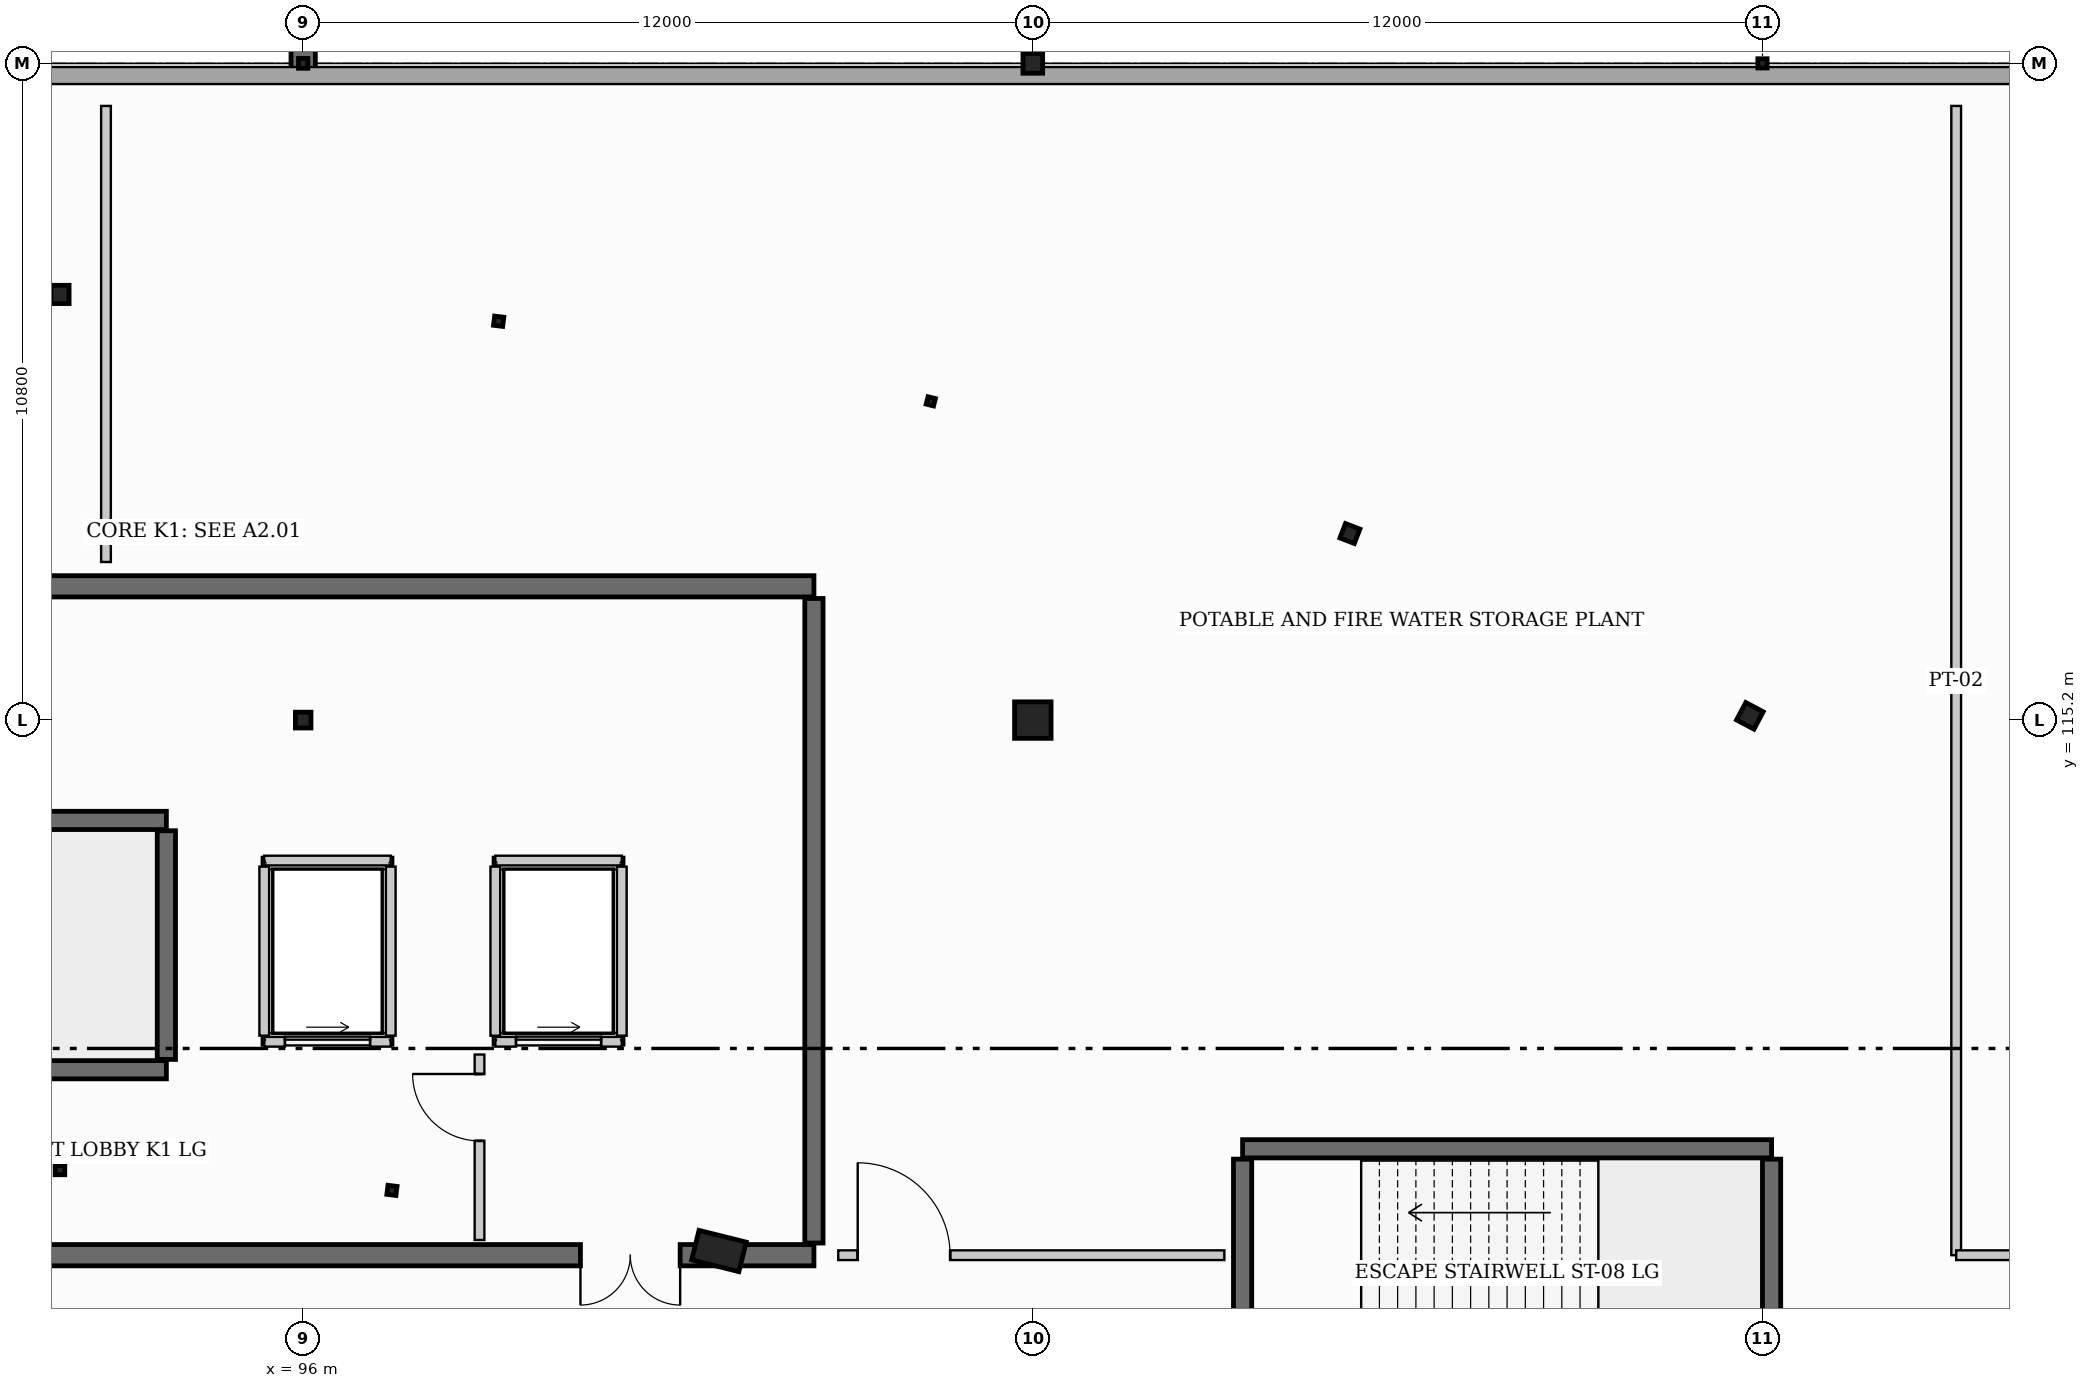
"""IFC4 building model, lengths in metres.
Left out: names, types, materials, properties, quantities, classifications, styles, units other than length and angle.
Written with IfcOpenShell. Run it as: python <this file> out.ifc"""

import sys

from ifc_helpers import new_model, si_unit, direction, frame, frame_2d, origin, origin_2d, place, context, subcontext, project, spatial, rectangle, hollow_rectangle, hollow_circle, i_section, extrude, element, fill, save


model = new_model("IFC4")
c1 = context("Model", 3, precision=1e-05, world=origin(), true_north=direction((0.0, 1.0)))
c2 = subcontext(c1, "Body", "Model", "MODEL_VIEW")
j1 = project(units=[si_unit("LENGTHUNIT", "METRE"), si_unit("PLANEANGLEUNIT", "RADIAN")], contexts=[c1])
p1 = place(None, origin())
s1 = spatial("IfcSite", under=j1, at=p1, CompositionType="ELEMENT")
p2 = place(p1, origin())
s2 = spatial("IfcBuilding", under=s1, at=p2, CompositionType="ELEMENT")
p3 = place(p2, frame((0.0, 0.0, -4.8)))
s3 = spatial("IfcBuildingStorey", under=s2, at=p3, CompositionType="ELEMENT", Elevation=-4.8)
p4 = place(p3, frame((96.0, 125.8, 0.0), z_axis=(0.0, 0.0, 1.0), x_axis=(0.0, 1.0, 0.0)))
e1 = element("IfcWall", 1, at=p4, inside=s3, PredefinedType="USERDEFINED", context=c2, shape_type="SweptSolid", body=[
    extrude(rectangle(XDim=5.2, YDim=0.4, at=frame_2d((2.6, 0.0))), origin(), (0.0, 0.0, 1.0), 4.8),
])
p5 = place(p3, frame((96.0, 115.2, 0.0), z_axis=(0.0, 0.0, 1.0), x_axis=(1.0, 0.0, 0.0)))
e2 = element("IfcColumn", 2, at=p5, inside=s3, PredefinedType="COLUMN", context=c2, shape_type="SweptSolid", body=[
    extrude(i_section(OverallWidth=0.256, OverallDepth=0.26, WebThickness=0.01, FlangeThickness=0.017, at=origin_2d()), origin(), (0.0, 0.0, 1.0), 4.8),
])
p6 = place(p3, frame((96.0, 126.0, 0.0), z_axis=(0.0, 0.0, 1.0), x_axis=(1.0, 0.0, 0.0)))
e3 = element("IfcColumn", 3, at=p6, inside=s3, PredefinedType="COLUMN", context=c2, shape_type="SweptSolid", body=[
    extrude(i_section(OverallWidth=0.154, OverallDepth=0.162, WebThickness=0.008, FlangeThickness=0.011, at=origin_2d()), origin(), (0.0, 0.0, 1.0), 4.8),
])
p7 = place(p3, frame((108.0, 115.2, 0.0), z_axis=(0.0, 0.0, 1.0), x_axis=(0.0, 1.0, 0.0)))
e4 = element("IfcColumn", 4, at=p7, inside=s3, PredefinedType="COLUMN", context=c2, shape_type="SweptSolid", body=[
    extrude(rectangle(XDim=0.6, YDim=0.6, at=origin_2d()), origin(), (0.0, 0.0, 1.0), 4.8),
])
p8 = place(p3, frame((108.0, 126.0, 0.0), z_axis=(0.0, 0.0, 1.0), x_axis=(0.0, 1.0, 0.0)))
e5 = element("IfcColumn", 5, at=p8, inside=s3, PredefinedType="COLUMN", context=c2, shape_type="SweptSolid", body=[
    extrude(hollow_circle(Radius=0.162, WallThickness=0.013, at=origin_2d()), origin(), (0.0, 0.0, 1.0), 4.8),
])
p9 = place(p3, frame((120.0, 126.0, 0.0), z_axis=(0.0, 0.0, 1.0), x_axis=(1.0, 0.0, 0.0)))
e6 = element("IfcColumn", 6, at=p9, inside=s3, PredefinedType="COLUMN", context=c2, shape_type="SweptSolid", body=[
    extrude(i_section(OverallWidth=0.152, OverallDepth=0.152, WebThickness=0.006, FlangeThickness=0.007, at=origin_2d()), origin(), (0.0, 0.0, 1.0), 4.8),
])
p10 = place(p3, frame((92.0, 122.2, 0.0), z_axis=(0.0, 0.0, 1.0), x_axis=(0.0, 1.0, 0.0)))
e7 = element("IfcColumn", 7, at=p10, inside=s3, PredefinedType="COLUMN", context=c2, shape_type="SweptSolid", body=[
    extrude(hollow_rectangle(XDim=0.3, YDim=0.3, WallThickness=0.012, at=origin_2d()), origin(), (0.0, 0.0, 1.0), 4.8),
])
p11 = place(p3, frame((92.0, 107.8, 0.0), z_axis=(0.0, 0.0, 1.0), x_axis=(0.0, 1.0, 0.0)))
e8 = element("IfcColumn", 8, at=p11, inside=s3, PredefinedType="COLUMN", context=c2, shape_type="SweptSolid", body=[
    extrude(i_section(OverallWidth=0.153, OverallDepth=0.158, WebThickness=0.007, FlangeThickness=0.01, at=origin_2d()), origin(), (0.0, 0.0, 1.0), 4.8),
])
p12 = place(p3, frame((99.215, 121.759, 0.0), z_axis=(0.0, 0.0, 1.0), x_axis=(0.121869343405, 0.992546151641, 0.0)))
e9 = element("IfcColumn", 9, at=p12, inside=s3, PredefinedType="COLUMN", context=c2, shape_type="SweptSolid", body=[
    extrude(i_section(OverallWidth=0.152, OverallDepth=0.152, WebThickness=0.006, FlangeThickness=0.007, at=origin_2d()), origin(), (0.0, 0.0, 1.0), 4.8),
])
p13 = place(p3, frame((97.46, 107.466, 0.0), z_axis=(0.0, 0.0, 1.0), x_axis=(0.121869343405, 0.992546151641, 0.0)))
e10 = element("IfcColumn", 10, at=p13, inside=s3, PredefinedType="COLUMN", context=c2, shape_type="SweptSolid", body=[
    extrude(hollow_rectangle(XDim=0.15, YDim=0.15, WallThickness=0.008, at=origin_2d()), origin(), (0.0, 0.0, 1.0), 4.8),
])
p14 = place(p3, frame((106.322, 120.442, 0.0), z_axis=(0.0, 0.0, 1.0), x_axis=(0.2419218956, 0.970295726276, 0.0)))
e11 = element("IfcColumn", 11, at=p14, inside=s3, PredefinedType="COLUMN", context=c2, shape_type="SweptSolid", body=[
    extrude(hollow_rectangle(XDim=0.125, YDim=0.125, WallThickness=0.006, at=origin_2d()), origin(), (0.0, 0.0, 1.0), 4.8),
])
p15 = place(p3, frame((102.838, 106.469, 0.0), z_axis=(0.0, 0.0, 1.0), x_axis=(0.2419218956, 0.970295726276, 0.0)))
e12 = element("IfcColumn", 12, at=p15, inside=s3, PredefinedType="PILASTER", context=c2, shape_type="SweptSolid", body=[
    extrude(rectangle(XDim=0.5, YDim=0.8, at=origin_2d()), origin(), (0.0, 0.0, 1.0), 4.8),
])
p16 = place(p3, frame((113.215, 118.268, 0.0), z_axis=(0.0, 0.0, 1.0), x_axis=(0.358367949545, 0.933580426497, 0.0)))
e13 = element("IfcColumn", 13, at=p16, inside=s3, PredefinedType="COLUMN", context=c2, shape_type="SweptSolid", body=[
    extrude(i_section(OverallWidth=0.254, OverallDepth=0.254, WebThickness=0.009, FlangeThickness=0.014, at=origin_2d()), origin(), (0.0, 0.0, 1.0), 4.8),
])
p17 = place(p3, frame((119.793, 115.27, 0.0), z_axis=(0.0, 0.0, 1.0), x_axis=(0.469471562786, 0.882947592859, 0.0)))
e14 = element("IfcColumn", 14, at=p17, inside=s3, PredefinedType="COLUMN", context=c2, shape_type="SweptSolid", body=[
    extrude(hollow_circle(Radius=0.162, WallThickness=0.013, at=origin_2d()), origin(), (0.0, 0.0, 1.0), 4.8),
])
p18 = place(p3, frame((84.0, 117.4, 0.0), z_axis=(0.0, 0.0, 1.0), x_axis=(1.0, 0.0, 0.0)))
e15 = element("IfcWall", 15, at=p18, inside=s3, PredefinedType="SHEAR", context=c2, shape_type="SweptSolid", body=[
    extrude(rectangle(XDim=20.4, YDim=0.35, at=frame_2d((10.2, 0.0))), origin(), (0.0, 0.0, 1.0), 4.8),
])
p19 = place(p3, frame((104.4, 106.4, 0.0), z_axis=(0.0, 0.0, 1.0), x_axis=(-1.0, 0.0, 0.0)))
e16 = element("IfcWall", 16, at=p19, inside=s3, PredefinedType="SHEAR", context=c2, shape_type="SweptSolid", body=[
    extrude(rectangle(XDim=20.4, YDim=0.35, at=frame_2d((10.2, 0.0))), origin(), (0.0, 0.0, 1.0), 4.8),
])
p20 = place(p19, frame((2.2, 0.0, 0.0)))
e17 = element("IfcOpeningElement", 17, at=p20, cuts=e16, PredefinedType="OPENING", context=c2, shape_type="SweptSolid", body=[
    extrude(rectangle(XDim=1.64, YDim=2.2, at=frame_2d((0.82, 1.1))), frame((0.0, 0.185, 0.0), z_axis=(0.0, -1.0, 0.0), x_axis=(1.0, 0.0, 0.0)), (0.0, 0.0, 1.0), 0.37),
])
p21 = place(p19, frame((13.0, 0.0, 0.0)))
e18 = element("IfcOpeningElement", 18, at=p21, cuts=e16, PredefinedType="OPENING", context=c2, shape_type="SweptSolid", body=[
    extrude(rectangle(XDim=1.52, YDim=2.16, at=frame_2d((0.76, 1.08))), frame((0.0, 0.185, 0.0), z_axis=(0.0, -1.0, 0.0), x_axis=(1.0, 0.0, 0.0)), (0.0, 0.0, 1.0), 0.37),
])
p22 = place(p3, frame((104.4, 117.2, 0.0), z_axis=(0.0, 0.0, 1.0), x_axis=(0.0, -1.0, 0.0)))
e19 = element("IfcWall", 19, at=p22, inside=s3, PredefinedType="SHEAR", context=c2, shape_type="SweptSolid", body=[
    extrude(rectangle(XDim=10.6, YDim=0.3, at=frame_2d((5.3, 0.0))), origin(), (0.0, 0.0, 1.0), 4.8),
])
p23 = place(p3, frame((85.05, 109.45, 0.0), z_axis=(0.0, 0.0, 1.0), x_axis=(1.0, 0.0, 0.0)))
e20 = element("IfcWall", 20, at=p23, inside=s3, PredefinedType="SHEAR", context=c2, shape_type="SweptSolid", body=[
    extrude(rectangle(XDim=8.7, YDim=0.3, at=frame_2d((4.35, 0.0))), origin(), (0.0, 0.0, 1.0), 4.8),
])
p24 = place(p23, frame((0.35, 0.0, 0.0)))
e21 = element("IfcOpeningElement", 21, at=p24, cuts=e20, PredefinedType="OPENING", context=c2, shape_type="SweptSolid", body=[
    extrude(rectangle(XDim=1.1, YDim=2.15, at=frame_2d((0.55, 1.075))), frame((0.0, 0.16, 0.0), z_axis=(0.0, -1.0, 0.0), x_axis=(1.0, 0.0, 0.0)), (0.0, 0.0, 1.0), 0.32),
])
p25 = place(p3, frame((93.75, 113.55, 0.0), z_axis=(0.0, 0.0, 1.0), x_axis=(-1.0, 0.0, 0.0)))
e22 = element("IfcWall", 22, at=p25, inside=s3, PredefinedType="SHEAR", context=c2, shape_type="SweptSolid", body=[
    extrude(rectangle(XDim=8.7, YDim=0.3, at=frame_2d((4.35, 0.0))), origin(), (0.0, 0.0, 1.0), 4.8),
])
p26 = place(p3, frame((93.75, 109.62, 0.0), z_axis=(0.0, 0.0, 1.0), x_axis=(0.0, 1.0, 0.0)))
e23 = element("IfcWall", 23, at=p26, inside=s3, PredefinedType="SHEAR", context=c2, shape_type="SweptSolid", body=[
    extrude(rectangle(XDim=3.76, YDim=0.3, at=frame_2d((1.88, 0.0))), origin(), (0.0, 0.0, 1.0), 4.8),
])
p27 = place(p3, frame((120.15, 108.15, 0.0), z_axis=(0.0, 0.0, 1.0), x_axis=(-1.0, 0.0, 0.0)))
e24 = element("IfcWall", 24, at=p27, inside=s3, PredefinedType="SHEAR", context=c2, shape_type="SweptSolid", body=[
    extrude(rectangle(XDim=8.7, YDim=0.3, at=frame_2d((4.35, 0.0))), origin(), (0.0, 0.0, 1.0), 4.8),
])
for number, where, z_axis, x_axis in (
    (25, (111.45, 104.22, 0.0), (0.0, 0.0, 1.0), (0.0, 1.0, 0.0)),
    (26, (120.15, 104.22, 0.0), (0.0, 0.0, 1.0), (0.0, 1.0, 0.0)),
):
    element("IfcWall", number, at=place(p3, frame(where, z_axis=z_axis, x_axis=x_axis)), inside=s3, PredefinedType="SHEAR", context=c2, shape_type="SweptSolid", body=[
        extrude(rectangle(XDim=3.76, YDim=0.3, at=frame_2d((1.88, 0.0))), origin(), (0.0, 0.0, 1.0), 4.8),
    ])
p28 = place(p3, frame((50.0, 125.8, 0.0), z_axis=(0.0, 0.0, 1.0), x_axis=(1.0, 0.0, 0.0)))
e27 = element("IfcWall", 27, at=p28, inside=s3, PredefinedType="STANDARD", context=c2, shape_type="SweptSolid", body=[
    extrude(rectangle(XDim=82.0, YDim=0.28, at=frame_2d((41.0, 0.0))), origin(), (0.0, 0.0, 1.0), 3.455),
])
p29 = place(p3, frame((95.36, 109.91, 0.0), z_axis=(0.0, 0.0, 1.0), x_axis=(1.0, 0.0, 0.0)))
e28 = element("IfcWall", 28, at=p29, inside=s3, PredefinedType="PARTITIONING", context=c2, shape_type="SweptSolid", body=[
    extrude(rectangle(XDim=2.08, YDim=0.16, at=frame_2d((1.04, 0.0))), origin(), (0.0, 0.0, 1.0), 4.43),
])
p30 = place(p29, frame((0.34, 0.0, 0.0)))
e29 = element("IfcOpeningElement", 29, at=p30, cuts=e28, PredefinedType="OPENING", context=c2, shape_type="SweptSolid", body=[
    extrude(rectangle(XDim=1.4, YDim=2.2, at=frame_2d((0.7, 1.1))), frame((0.0, 0.09, 0.0), z_axis=(0.0, -1.0, 0.0), x_axis=(1.0, 0.0, 0.0)), (0.0, 0.0, 1.0), 0.18),
])
p31 = place(p3, frame((97.44, 112.89, 0.0), z_axis=(0.0, 0.0, 1.0), x_axis=(-1.0, 0.0, 0.0)))
e30 = element("IfcWall", 30, at=p31, inside=s3, PredefinedType="PARTITIONING", context=c2, shape_type="SweptSolid", body=[
    extrude(rectangle(XDim=2.08, YDim=0.16, at=frame_2d((1.04, 0.0))), origin(), (0.0, 0.0, 1.0), 4.43),
])
for number, where, z_axis, x_axis in (
    (31, (95.36, 112.79, 0.0), (0.0, 0.0, 1.0), (0.0, -1.0, 0.0)),
    (32, (97.44, 110.01, 0.0), (0.0, 0.0, 1.0), (0.0, 1.0, 0.0)),
):
    element("IfcWall", number, at=place(p3, frame(where, z_axis=z_axis, x_axis=x_axis)), inside=s3, PredefinedType="PARTITIONING", context=c2, shape_type="SweptSolid", body=[
        extrude(rectangle(XDim=2.78, YDim=0.16, at=frame_2d((1.39, 0.0))), origin(), (0.0, 0.0, 1.0), 4.43),
    ])
p32 = place(p3, frame((99.16, 109.91, 0.0), z_axis=(0.0, 0.0, 1.0), x_axis=(1.0, 0.0, 0.0)))
e33 = element("IfcWall", 33, at=p32, inside=s3, PredefinedType="PARTITIONING", context=c2, shape_type="SweptSolid", body=[
    extrude(rectangle(XDim=2.08, YDim=0.16, at=frame_2d((1.04, 0.0))), origin(), (0.0, 0.0, 1.0), 4.43),
])
p33 = place(p32, frame((0.34, 0.0, 0.0)))
e34 = element("IfcOpeningElement", 34, at=p33, cuts=e33, PredefinedType="OPENING", context=c2, shape_type="SweptSolid", body=[
    extrude(rectangle(XDim=1.4, YDim=2.2, at=frame_2d((0.7, 1.1))), frame((0.0, 0.09, 0.0), z_axis=(0.0, -1.0, 0.0), x_axis=(1.0, 0.0, 0.0)), (0.0, 0.0, 1.0), 0.18),
])
p34 = place(p3, frame((101.24, 112.89, 0.0), z_axis=(0.0, 0.0, 1.0), x_axis=(-1.0, 0.0, 0.0)))
e35 = element("IfcWall", 35, at=p34, inside=s3, PredefinedType="PARTITIONING", context=c2, shape_type="SweptSolid", body=[
    extrude(rectangle(XDim=2.08, YDim=0.16, at=frame_2d((1.04, 0.0))), origin(), (0.0, 0.0, 1.0), 4.43),
])
for number, where, z_axis, x_axis in (
    (36, (99.16, 112.79, 0.0), (0.0, 0.0, 1.0), (0.0, -1.0, 0.0)),
    (37, (101.24, 110.01, 0.0), (0.0, 0.0, 1.0), (0.0, 1.0, 0.0)),
):
    element("IfcWall", number, at=place(p3, frame(where, z_axis=z_axis, x_axis=x_axis)), inside=s3, PredefinedType="PARTITIONING", context=c2, shape_type="SweptSolid", body=[
        extrude(rectangle(XDim=2.78, YDim=0.16, at=frame_2d((1.39, 0.0))), origin(), (0.0, 0.0, 1.0), 4.43),
    ])
p35 = place(p3, frame((98.9, 106.65, 0.0), z_axis=(0.0, 0.0, 1.0), x_axis=(0.0, 1.0, 0.0)))
e38 = element("IfcWall", 38, at=p35, inside=s3, PredefinedType="PARTITIONING", context=c2, shape_type="SweptSolid", body=[
    extrude(rectangle(XDim=3.05, YDim=0.16, at=frame_2d((1.525, 0.0))), origin(), (0.0, 0.0, 1.0), 4.43),
])
p36 = place(p35, frame((1.63, 0.0, 0.0)))
e39 = element("IfcOpeningElement", 39, at=p36, cuts=e38, PredefinedType="OPENING", context=c2, shape_type="SweptSolid", body=[
    extrude(rectangle(XDim=1.1, YDim=2.15, at=frame_2d((0.55, 1.075))), frame((0.0, 0.09, 0.0), z_axis=(0.0, -1.0, 0.0), x_axis=(1.0, 0.0, 0.0)), (0.0, 0.0, 1.0), 0.18),
])
p37 = place(p3, frame((92.757, 117.8, 0.0), z_axis=(0.0, 0.0, 1.0), x_axis=(0.0, 1.0, 0.0)))
e40 = element("IfcWall", 40, at=p37, inside=s3, PredefinedType="PARTITIONING", context=c2, shape_type="SweptSolid", body=[
    extrude(rectangle(XDim=7.5, YDim=0.16, at=frame_2d((3.75, 0.0))), origin(), (0.0, 0.0, 1.0), 4.111),
])
p38 = place(p3, frame((104.8, 106.4, 0.0), z_axis=(0.0, 0.0, 1.0), x_axis=(1.0, 0.0, 0.0)))
e41 = element("IfcWall", 41, at=p38, inside=s3, PredefinedType="PARTITIONING", context=c2, shape_type="SweptSolid", body=[
    extrude(rectangle(XDim=6.35, YDim=0.16, at=frame_2d((3.175, 0.0))), origin(), (0.0, 0.0, 1.0), 4.43),
])
p39 = place(p38, frame((0.32, 0.0, 0.0)))
e42 = element("IfcOpeningElement", 42, at=p39, cuts=e41, PredefinedType="OPENING", context=c2, shape_type="SweptSolid", body=[
    extrude(rectangle(XDim=1.52, YDim=2.16, at=frame_2d((0.76, 1.08))), frame((0.0, 0.09, 0.0), z_axis=(0.0, -1.0, 0.0), x_axis=(1.0, 0.0, 0.0)), (0.0, 0.0, 1.0), 0.18),
])
p40 = place(p3, frame((123.186, 106.4, 0.0), z_axis=(0.0, 0.0, 1.0), x_axis=(0.0, 1.0, 0.0)))
e43 = element("IfcWall", 43, at=p40, inside=s3, PredefinedType="PARTITIONING", context=c2, shape_type="SweptSolid", body=[
    extrude(rectangle(XDim=18.9, YDim=0.16, at=frame_2d((9.45, 0.0))), origin(), (0.0, 0.0, 1.0), 4.43),
])
p41 = place(p3, frame((123.186, 106.4, 0.0), z_axis=(0.0, 0.0, 1.0), x_axis=(1.0, 0.0, 0.0)))
e44 = element("IfcWall", 44, at=p41, inside=s3, PredefinedType="PARTITIONING", context=c2, shape_type="SweptSolid", body=[
    extrude(rectangle(XDim=8.114, YDim=0.16, at=frame_2d((4.057, 0.0))), origin(), (0.0, 0.0, 1.0), 4.43),
])
p42 = place(p41, frame((3.407, 0.0, 0.0)))
e45 = element("IfcOpeningElement", 45, at=p42, cuts=e44, PredefinedType="OPENING", context=c2, shape_type="SweptSolid", body=[
    extrude(rectangle(XDim=1.84, YDim=2.22, at=frame_2d((0.92, 1.11))), frame((0.0, 0.09, 0.0), z_axis=(0.0, -1.0, 0.0), x_axis=(1.0, 0.0, 0.0)), (0.0, 0.0, 1.0), 0.18),
])
p43 = place(p30, origin())
e46 = element("IfcDoor", 46, at=p43, inside=s3, OperationType="SLIDING_TO_LEFT", PredefinedType="DOOR", context=c2, shape_type="SweptSolid", body=[
    extrude(rectangle(XDim=1.4, YDim=2.2, at=frame_2d((0.7, 1.1))), frame((0.0, 0.025, 0.0), z_axis=(0.0, -1.0, 0.0), x_axis=(1.0, 0.0, 0.0)), (0.0, 0.0, 1.0), 0.05),
])
fill(e29, e46)
p44 = place(p33, origin())
e47 = element("IfcDoor", 47, at=p44, inside=s3, OperationType="SLIDING_TO_LEFT", PredefinedType="DOOR", context=c2, shape_type="SweptSolid", body=[
    extrude(rectangle(XDim=1.4, YDim=2.2, at=frame_2d((0.7, 1.1))), frame((0.0, 0.025, 0.0), z_axis=(0.0, -1.0, 0.0), x_axis=(1.0, 0.0, 0.0)), (0.0, 0.0, 1.0), 0.05),
])
fill(e34, e47)
p45 = place(p20, origin())
e48 = element("IfcDoor", 48, at=p45, inside=s3, OperationType="DOUBLE_DOOR_SINGLE_SWING", PredefinedType="DOOR", context=c2, shape_type="SweptSolid", body=[
    extrude(rectangle(XDim=1.64, YDim=2.2, at=frame_2d((0.82, 1.1))), frame((0.0, 0.025, 0.0), z_axis=(0.0, -1.0, 0.0), x_axis=(1.0, 0.0, 0.0)), (0.0, 0.0, 1.0), 0.05),
])
fill(e17, e48)
p46 = place(p36, origin())
e49 = element("IfcDoor", 49, at=p46, inside=s3, OperationType="SINGLE_SWING_RIGHT", PredefinedType="DOOR", context=c2, shape_type="SweptSolid", body=[
    extrude(rectangle(XDim=1.1, YDim=2.15, at=frame_2d((0.55, 1.075))), frame((0.0, 0.025, 0.0), z_axis=(0.0, -1.0, 0.0), x_axis=(1.0, 0.0, 0.0)), (0.0, 0.0, 1.0), 0.05),
])
fill(e39, e49)
p47 = place(p39, origin())
e50 = element("IfcDoor", 50, at=p47, inside=s3, OperationType="SINGLE_SWING_LEFT", PredefinedType="DOOR", context=c2, shape_type="SweptSolid", body=[
    extrude(rectangle(XDim=1.52, YDim=2.16, at=frame_2d((0.76, 1.08))), frame((0.0, 0.025, 0.0), z_axis=(0.0, -1.0, 0.0), x_axis=(1.0, 0.0, 0.0)), (0.0, 0.0, 1.0), 0.05),
])
fill(e42, e50)
save(model, sys.argv[1])
